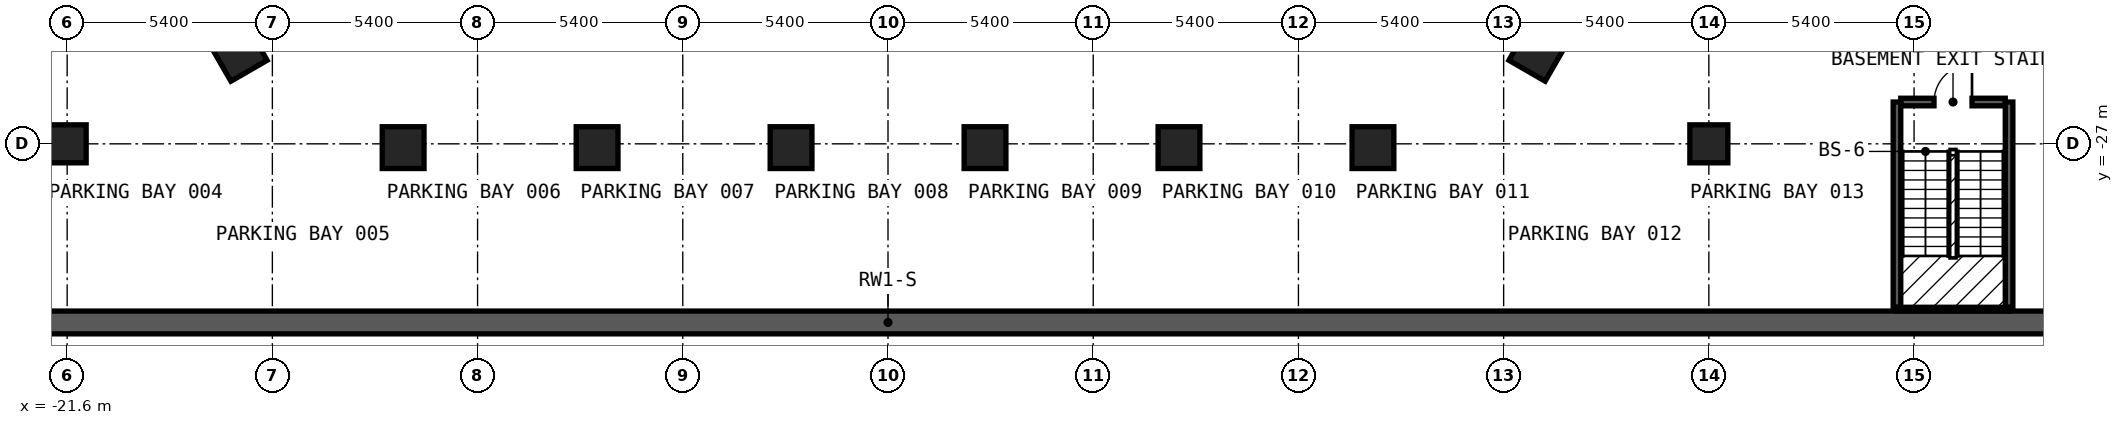
"""IFC4 building model, lengths in metres.
Left out: names, types, materials, properties, quantities, classifications, styles, units other than length and angle.
Written with IfcOpenShell. Run it as: python <this file> out.ifc"""

import sys

from ifc_helpers import new_model, si_unit, direction, frame, frame_2d, origin, origin_2d, place, context, subcontext, project, spatial, rectangle, extrude, element, fill, save


model = new_model("IFC4")
c1 = context("Model", 3, precision=1e-05, world=origin(), true_north=direction((0.0, 1.0)))
c2 = subcontext(c1, "Body", "Model", "MODEL_VIEW")
j1 = project(units=[si_unit("LENGTHUNIT", "METRE"), si_unit("PLANEANGLEUNIT", "RADIAN")], contexts=[c1])
p1 = place(None, origin())
s1 = spatial("IfcSite", under=j1, at=p1, CompositionType="ELEMENT")
p2 = place(p1, origin())
s2 = spatial("IfcBuilding", under=s1, at=p2, CompositionType="ELEMENT")
p3 = place(p2, frame((0.0, 0.0, -4.2)))
s3 = spatial("IfcBuildingStorey", under=s2, at=p3, CompositionType="ELEMENT", Elevation=-4.2)
p4 = place(p3, frame((-48.0, -31.7, 0.0), z_axis=(0.0, 0.0, 1.0), x_axis=(1.0, 0.0, 0.0)))
e1 = element("IfcWall", 1, at=p4, inside=s3, PredefinedType="SOLIDWALL", context=c2, shape_type="SweptSolid", body=[
    extrude(rectangle(XDim=96.0, YDim=0.6, at=frame_2d((48.0, 0.0))), origin(), (0.0, 0.0, 1.0), 4.2),
])
for number, where, z_axis, x_axis in (
    (2, (-17.089, -24.601, 0.0), (0.0, 0.0, 1.0), (0.5, -0.866, 0.0)),
    (3, (-12.759, -27.1, 0.0), (0.0, 0.0, 1.0), (1.0, 0.0, 0.0)),
    (4, (-7.655, -27.1, 0.0), (0.0, 0.0, 1.0), (1.0, 0.0, 0.0)),
    (5, (-2.551, -27.1, 0.0), (0.0, 0.0, 1.0), (1.0, 0.0, 0.0)),
    (6, (2.553, -27.1, 0.0), (0.0, 0.0, 1.0), (1.0, 0.0, 0.0)),
    (7, (7.657, -27.1, 0.0), (0.0, 0.0, 1.0), (1.0, 0.0, 0.0)),
    (8, (12.761, -27.1, 0.0), (0.0, 0.0, 1.0), (1.0, 0.0, 0.0)),
    (9, (17.09, -24.6, 0.0), (0.0, 0.0, 1.0), (0.5, 0.866, 0.0)),
):
    element("IfcColumn", number, at=place(p3, frame(where, z_axis=z_axis, x_axis=x_axis)), inside=s3, PredefinedType="COLUMN", context=c2, shape_type="SweptSolid", body=[
        extrude(rectangle(XDim=1.1, YDim=1.1, at=origin_2d()), origin(), (0.0, 0.0, 1.0), 4.2),
    ])
for number, where, z_axis, x_axis in (
    (10, (-21.6, -27.0, 0.0), (0.0, 0.0, 1.0), (1.0, 0.0, 0.0)),
    (11, (21.6, -27.0, 0.0), (0.0, 0.0, 1.0), (1.0, 0.0, 0.0)),
):
    element("IfcColumn", number, at=place(p3, frame(where, z_axis=z_axis, x_axis=x_axis)), inside=s3, PredefinedType="COLUMN", context=c2, shape_type="SweptSolid", body=[
        extrude(rectangle(XDim=1.0, YDim=1.0, at=origin_2d()), origin(), (0.0, 0.0, 1.0), 4.2),
    ])
p5 = place(p3, frame((26.65, -25.9, 0.0), z_axis=(0.0, 0.0, 1.0), x_axis=(1.0, 0.0, 0.0)))
e12 = element("IfcWall", 12, at=p5, inside=s3, PredefinedType="SOLIDWALL", context=c2, shape_type="SweptSolid", body=[
    extrude(rectangle(XDim=2.75, YDim=0.2, at=frame_2d((1.375, 0.0))), origin(), (0.0, 0.0, 1.0), 3.75),
])
p6 = place(p5, frame((1.875, 0.0, 0.0), z_axis=(0.0, 0.0, 1.0), x_axis=(-1.0, 0.0, 0.0)))
e13 = element("IfcOpeningElement", 13, at=p6, cuts=e12, PredefinedType="OPENING", context=c2, shape_type="SweptSolid", body=[
    extrude(rectangle(XDim=1.0, YDim=2.1, at=frame_2d((0.5, 1.05))), frame((0.0, 0.11, 0.0), z_axis=(0.0, -1.0, 0.0), x_axis=(1.0, 0.0, 0.0)), (0.0, 0.0, 1.0), 0.22),
])
for number, where, z_axis, x_axis in (
    (14, (26.55, -31.3, 0.0), (0.0, 0.0, 1.0), (0.0, 1.0, 0.0)),
    (15, (29.5, -31.3, 0.0), (0.0, 0.0, 1.0), (0.0, 1.0, 0.0)),
):
    element("IfcWall", number, at=place(p3, frame(where, z_axis=z_axis, x_axis=x_axis)), inside=s3, PredefinedType="SOLIDWALL", context=c2, shape_type="SweptSolid", body=[
        extrude(rectangle(XDim=5.4, YDim=0.2, at=frame_2d((2.7, 0.0))), origin(), (0.0, 0.0, 1.0), 3.75),
    ])
p7 = place(p3, frame((26.55, -31.35, 0.0), z_axis=(0.0, 0.0, 1.0), x_axis=(1.0, 0.0, 0.0)))
e16 = element("IfcWall", 16, at=p7, inside=s3, PredefinedType="SOLIDWALL", context=c2, shape_type="SweptSolid", body=[
    extrude(rectangle(XDim=2.95, YDim=0.1, at=frame_2d((1.475, 0.0))), origin(), (0.0, 0.0, 1.0), 3.75),
])
p8 = place(p6, origin())
e17 = element("IfcDoor", 17, at=p8, inside=s3, OperationType="SINGLE_SWING_LEFT", PredefinedType="DOOR", context=c2, shape_type="SweptSolid", body=[
    extrude(rectangle(XDim=1.0, YDim=2.1, at=frame_2d((0.5, 1.05))), frame((0.0, 0.025, 0.0), z_axis=(0.0, -1.0, 0.0), x_axis=(1.0, 0.0, 0.0)), (0.0, 0.0, 1.0), 0.05),
])
fill(e13, e17)
save(model, sys.argv[1])
